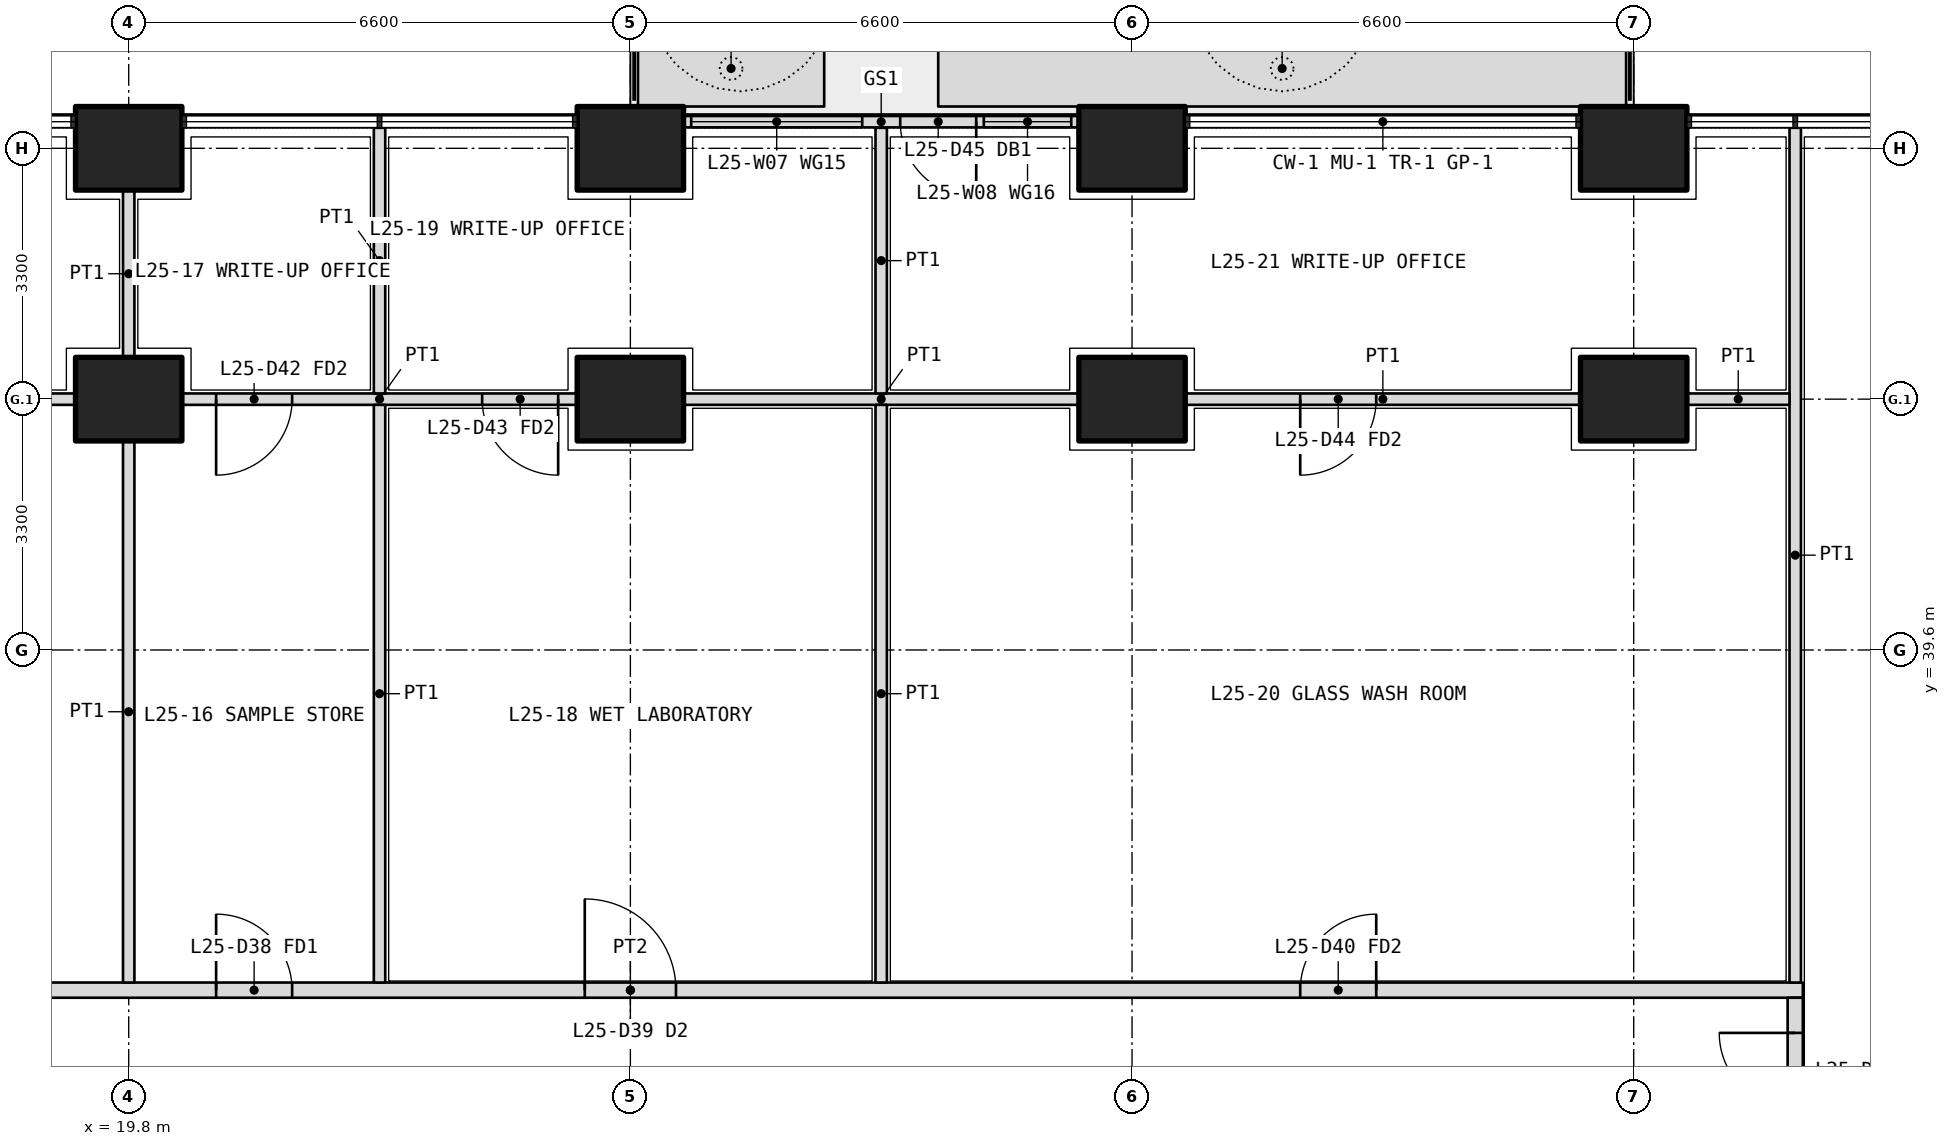
"""IFC4 building model, lengths in metres.
Left out: names, types, materials, properties, quantities, classifications, styles, units other than length and angle.
Written with IfcOpenShell. Run it as: python <this file> out.ifc"""

import sys

from ifc_helpers import new_model, si_unit, direction, frame, frame_2d, origin, origin_2d, place, context, subcontext, project, spatial, polyline, rectangle, outline, extrude, element, fill, save


model = new_model("IFC4")
c1 = context("Model", 3, precision=1e-05, world=origin(), true_north=direction((0.0, 1.0)))
c2 = subcontext(c1, "Body", "Model", "MODEL_VIEW")
j1 = project(units=[si_unit("LENGTHUNIT", "METRE"), si_unit("PLANEANGLEUNIT", "RADIAN")], contexts=[c1])
p1 = place(None, origin())
s1 = spatial("IfcSite", under=j1, at=p1, CompositionType="ELEMENT")
p2 = place(p1, origin())
s2 = spatial("IfcBuilding", under=s1, at=p2, CompositionType="ELEMENT")
p3 = place(p2, frame((0.0, 0.0, 111.6)))
s3 = spatial("IfcBuildingStorey", under=s2, at=p3, CompositionType="ELEMENT", Elevation=111.6)
for number, where, z_axis, x_axis in (
    (1, (19.8, 46.2, 0.0), (0.0, 0.0, 1.0), (1.0, 0.0, 0.0)),
    (2, (26.4, 46.2, 0.0), (0.0, 0.0, 1.0), (1.0, 0.0, 0.0)),
    (3, (33.0, 46.2, 0.0), (0.0, 0.0, 1.0), (1.0, 0.0, 0.0)),
    (4, (39.6, 46.2, 0.0), (0.0, 0.0, 1.0), (1.0, 0.0, 0.0)),
    (5, (19.8, 42.9, 0.0), (0.0, 0.0, 1.0), (1.0, 0.0, 0.0)),
    (6, (26.4, 42.9, 0.0), (0.0, 0.0, 1.0), (1.0, 0.0, 0.0)),
    (7, (33.0, 42.9, 0.0), (0.0, 0.0, 1.0), (1.0, 0.0, 0.0)),
    (8, (39.6, 42.9, 0.0), (0.0, 0.0, 1.0), (1.0, 0.0, 0.0)),
):
    element("IfcColumn", number, at=place(p3, frame(where, z_axis=z_axis, x_axis=x_axis)), inside=s3, PredefinedType="COLUMN", context=c2, shape_type="SweptSolid", body=[
        extrude(rectangle(XDim=1.4, YDim=1.1, at=origin_2d()), origin(), (0.0, 0.0, 1.0), 4.2),
    ])
p4 = place(p3, origin())
e9 = element("IfcWall", 9, at=p4, inside=s3, PredefinedType="USERDEFINED", context=c2, shape_type="SweptSolid", body=[
    extrude(outline(polyline([(26.5, 46.75), (28.95, 46.75), (28.95, 47.75), (26.5, 47.75), (26.5, 46.75)]), holes=[polyline([(26.65, 46.9), (28.8, 46.9), (28.8, 47.6), (26.65, 47.6), (26.65, 46.9)])]), origin(), (0.0, 0.0, 1.0), 1.05),
])
p5 = place(p3, origin())
e10 = element("IfcWall", 10, at=p5, inside=s3, PredefinedType="USERDEFINED", context=c2, shape_type="SweptSolid", body=[
    extrude(outline(polyline([(30.45, 46.75), (39.5, 46.75), (39.5, 47.75), (30.45, 47.75), (30.45, 46.75)]), holes=[polyline([(30.6, 46.9), (39.35, 46.9), (39.35, 47.6), (30.6, 47.6), (30.6, 46.9)])]), origin(), (0.0, 0.0, 1.0), 1.05),
])
p6 = place(p3, frame((32.3, 46.55, 0.0), z_axis=(0.0, 0.0, 1.0), x_axis=(-1.0, 0.0, 0.0)))
e11 = element("IfcWall", 11, at=p6, inside=s3, PredefinedType="SOLIDWALL", context=c2, shape_type="SweptSolid", body=[
    extrude(rectangle(XDim=5.2, YDim=0.15, at=frame_2d((2.6, 0.0))), origin(), (0.0, 0.0, 1.0), 2.7),
])
p7 = place(p6, frame((1.35, 0.0, 0.0)))
e12 = element("IfcOpeningElement", 12, at=p7, cuts=e11, PredefinedType="OPENING", context=c2, shape_type="SweptSolid", body=[
    extrude(rectangle(XDim=1.0, YDim=2.4, at=frame_2d((0.5, 1.2))), frame((0.0, 0.085, 0.0), z_axis=(0.0, -1.0, 0.0), x_axis=(1.0, 0.0, 0.0)), (0.0, 0.0, 1.0), 0.17),
])
p8 = place(p6, frame((0.1, 0.0, 0.1)))
e13 = element("IfcOpeningElement", 13, at=p8, cuts=e11, PredefinedType="OPENING", context=c2, shape_type="SweptSolid", body=[
    extrude(rectangle(XDim=1.15, YDim=2.3, at=frame_2d((0.575, 1.15))), frame((0.0, 0.085, 0.0), z_axis=(0.0, -1.0, 0.0), x_axis=(1.0, 0.0, 0.0)), (0.0, 0.0, 1.0), 0.17),
])
p9 = place(p6, frame((2.85, 0.0, 0.1)))
e14 = element("IfcOpeningElement", 14, at=p9, cuts=e11, PredefinedType="OPENING", context=c2, shape_type="SweptSolid", body=[
    extrude(rectangle(XDim=2.25, YDim=2.3, at=frame_2d((1.125, 1.15))), frame((0.0, 0.085, 0.0), z_axis=(0.0, -1.0, 0.0), x_axis=(1.0, 0.0, 0.0)), (0.0, 0.0, 1.0), 0.17),
])
p10 = place(p3, frame((10.975, 35.125, 0.0), z_axis=(0.0, 0.0, 1.0), x_axis=(1.0, 0.0, 0.0)))
e15 = element("IfcWall", 15, at=p10, inside=s3, PredefinedType="PARTITIONING", context=c2, shape_type="SweptSolid", body=[
    extrude(rectangle(XDim=30.85, YDim=0.2, at=frame_2d((15.425, 0.0))), origin(), (0.0, 0.0, 1.0), 2.85),
])
p11 = place(p10, frame((3.962, 0.0, 0.0)))
e16 = element("IfcOpeningElement", 16, at=p11, cuts=e15, PredefinedType="OPENING", context=c2, shape_type="SweptSolid", body=[
    extrude(rectangle(XDim=1.0, YDim=2.1, at=frame_2d((0.5, 1.05))), frame((0.0, 0.11, 0.0), z_axis=(0.0, -1.0, 0.0), x_axis=(1.0, 0.0, 0.0)), (0.0, 0.0, 1.0), 0.22),
])
p12 = place(p10, frame((9.975, 0.0, 0.0)))
e17 = element("IfcOpeningElement", 17, at=p12, cuts=e15, PredefinedType="OPENING", context=c2, shape_type="SweptSolid", body=[
    extrude(rectangle(XDim=1.0, YDim=2.1, at=frame_2d((0.5, 1.05))), frame((0.0, 0.11, 0.0), z_axis=(0.0, -1.0, 0.0), x_axis=(1.0, 0.0, 0.0)), (0.0, 0.0, 1.0), 0.22),
])
p13 = place(p10, frame((14.825, 0.0, 0.0)))
e18 = element("IfcOpeningElement", 18, at=p13, cuts=e15, PredefinedType="OPENING", context=c2, shape_type="SweptSolid", body=[
    extrude(rectangle(XDim=1.2, YDim=2.1, at=frame_2d((0.6, 1.05))), frame((0.0, 0.11, 0.0), z_axis=(0.0, -1.0, 0.0), x_axis=(1.0, 0.0, 0.0)), (0.0, 0.0, 1.0), 0.22),
])
p14 = place(p10, frame((24.238, 0.0, 0.0)))
e19 = element("IfcOpeningElement", 19, at=p14, cuts=e15, PredefinedType="OPENING", context=c2, shape_type="SweptSolid", body=[
    extrude(rectangle(XDim=1.0, YDim=2.1, at=frame_2d((0.5, 1.05))), frame((0.0, 0.11, 0.0), z_axis=(0.0, -1.0, 0.0), x_axis=(1.0, 0.0, 0.0)), (0.0, 0.0, 1.0), 0.22),
])
p15 = place(p3, frame((41.725, 7.4, 0.0), z_axis=(0.0, 0.0, 1.0), x_axis=(0.0, 1.0, 0.0)))
e20 = element("IfcWall", 20, at=p15, inside=s3, PredefinedType="PARTITIONING", context=c2, shape_type="SweptSolid", body=[
    extrude(rectangle(XDim=27.625, YDim=0.2, at=frame_2d((13.812, 0.0))), origin(), (0.0, 0.0, 1.0), 2.85),
])
p16 = place(p15, frame((5.65, 0.0, 0.0)))
e21 = element("IfcOpeningElement", 21, at=p16, cuts=e20, PredefinedType="OPENING", context=c2, shape_type="SweptSolid", body=[
    extrude(rectangle(XDim=1.0, YDim=2.1, at=frame_2d((0.5, 1.05))), frame((0.0, 0.11, 0.0), z_axis=(0.0, -1.0, 0.0), x_axis=(1.0, 0.0, 0.0)), (0.0, 0.0, 1.0), 0.22),
])
p17 = place(p15, frame((13.5, 0.0, 0.0)))
e22 = element("IfcOpeningElement", 22, at=p17, cuts=e20, PredefinedType="OPENING", context=c2, shape_type="SweptSolid", body=[
    extrude(rectangle(XDim=1.0, YDim=2.1, at=frame_2d((0.5, 1.05))), frame((0.0, 0.11, 0.0), z_axis=(0.0, -1.0, 0.0), x_axis=(1.0, 0.0, 0.0)), (0.0, 0.0, 1.0), 0.22),
])
p18 = place(p15, frame((16.85, 0.0, 0.0)))
e23 = element("IfcOpeningElement", 23, at=p18, cuts=e20, PredefinedType="OPENING", context=c2, shape_type="SweptSolid", body=[
    extrude(rectangle(XDim=0.9, YDim=2.1, at=frame_2d((0.45, 1.05))), frame((0.0, 0.11, 0.0), z_axis=(0.0, -1.0, 0.0), x_axis=(1.0, 0.0, 0.0)), (0.0, 0.0, 1.0), 0.22),
])
p19 = place(p15, frame((21.8, 0.0, 0.0)))
e24 = element("IfcOpeningElement", 24, at=p19, cuts=e20, PredefinedType="OPENING", context=c2, shape_type="SweptSolid", body=[
    extrude(rectangle(XDim=1.0, YDim=2.1, at=frame_2d((0.5, 1.05))), frame((0.0, 0.11, 0.0), z_axis=(0.0, -1.0, 0.0), x_axis=(1.0, 0.0, 0.0)), (0.0, 0.0, 1.0), 0.22),
])
p20 = place(p15, frame((26.163, 0.0, 0.0)))
e25 = element("IfcOpeningElement", 25, at=p20, cuts=e20, PredefinedType="OPENING", context=c2, shape_type="SweptSolid", body=[
    extrude(rectangle(XDim=1.0, YDim=2.1, at=frame_2d((0.5, 1.05))), frame((0.0, 0.11, 0.0), z_axis=(0.0, -1.0, 0.0), x_axis=(1.0, 0.0, 0.0)), (0.0, 0.0, 1.0), 0.22),
])
p21 = place(p3, frame((41.725, 46.47, 0.0), z_axis=(0.0, 0.0, 1.0), x_axis=(0.0, -1.0, 0.0)))
e26 = element("IfcWall", 26, at=p21, inside=s3, PredefinedType="PARTITIONING", context=c2, shape_type="SweptSolid", body=[
    extrude(rectangle(XDim=11.245, YDim=0.15, at=frame_2d((5.623, 0.0))), origin(), (0.0, 0.0, 1.0), 2.7),
])
p22 = place(p3, frame((41.65, 42.9, 0.0), z_axis=(0.0, 0.0, 1.0), x_axis=(-1.0, 0.0, 0.0)))
e27 = element("IfcWall", 27, at=p22, inside=s3, PredefinedType="PARTITIONING", context=c2, shape_type="SweptSolid", body=[
    extrude(rectangle(XDim=1.35, YDim=0.15, at=frame_2d((0.675, 0.0))), origin(), (0.0, 0.0, 1.0), 3.9),
])
p23 = place(p3, frame((38.9, 42.9, 0.0), z_axis=(0.0, 0.0, 1.0), x_axis=(-1.0, 0.0, 0.0)))
e28 = element("IfcWall", 28, at=p23, inside=s3, PredefinedType="PARTITIONING", context=c2, shape_type="SweptSolid", body=[
    extrude(rectangle(XDim=5.2, YDim=0.15, at=frame_2d((2.6, 0.0))), origin(), (0.0, 0.0, 1.0), 3.9),
])
p24 = place(p23, frame((2.688, 0.0, 0.0)))
e29 = element("IfcOpeningElement", 29, at=p24, cuts=e28, PredefinedType="OPENING", context=c2, shape_type="SweptSolid", body=[
    extrude(rectangle(XDim=1.0, YDim=2.1, at=frame_2d((0.5, 1.05))), frame((0.0, 0.085, 0.0), z_axis=(0.0, -1.0, 0.0), x_axis=(1.0, 0.0, 0.0)), (0.0, 0.0, 1.0), 0.17),
])
p25 = place(p3, frame((32.3, 42.9, 0.0), z_axis=(0.0, 0.0, 1.0), x_axis=(-1.0, 0.0, 0.0)))
e30 = element("IfcWall", 30, at=p25, inside=s3, PredefinedType="PARTITIONING", context=c2, shape_type="SweptSolid", body=[
    extrude(rectangle(XDim=5.2, YDim=0.15, at=frame_2d((2.6, 0.0))), origin(), (0.0, 0.0, 1.0), 3.9),
])
p26 = place(p3, frame((25.7, 42.9, 0.0), z_axis=(0.0, 0.0, 1.0), x_axis=(-1.0, 0.0, 0.0)))
e31 = element("IfcWall", 31, at=p26, inside=s3, PredefinedType="PARTITIONING", context=c2, shape_type="SweptSolid", body=[
    extrude(rectangle(XDim=5.2, YDim=0.15, at=frame_2d((2.6, 0.0))), origin(), (0.0, 0.0, 1.0), 3.9),
])
p27 = place(p26, frame((3.75, 0.0, 0.0)))
e32 = element("IfcOpeningElement", 32, at=p27, cuts=e31, PredefinedType="OPENING", context=c2, shape_type="SweptSolid", body=[
    extrude(rectangle(XDim=1.0, YDim=2.1, at=frame_2d((0.5, 1.05))), frame((0.0, 0.085, 0.0), z_axis=(0.0, -1.0, 0.0), x_axis=(1.0, 0.0, 0.0)), (0.0, 0.0, 1.0), 0.17),
])
p28 = place(p26, frame((0.25, 0.0, 0.0)))
e33 = element("IfcOpeningElement", 33, at=p28, cuts=e31, PredefinedType="OPENING", context=c2, shape_type="SweptSolid", body=[
    extrude(rectangle(XDim=1.0, YDim=2.1, at=frame_2d((0.5, 1.05))), frame((0.0, 0.085, 0.0), z_axis=(0.0, -1.0, 0.0), x_axis=(1.0, 0.0, 0.0)), (0.0, 0.0, 1.0), 0.17),
])
p29 = place(p3, frame((19.1, 42.9, 0.0), z_axis=(0.0, 0.0, 1.0), x_axis=(-1.0, 0.0, 0.0)))
e34 = element("IfcWall", 34, at=p29, inside=s3, PredefinedType="PARTITIONING", context=c2, shape_type="SweptSolid", body=[
    extrude(rectangle(XDim=5.2, YDim=0.15, at=frame_2d((2.6, 0.0))), origin(), (0.0, 0.0, 1.0), 3.9),
])
p30 = place(p3, frame((19.8, 45.65, 0.0), z_axis=(0.0, 0.0, 1.0), x_axis=(0.0, -1.0, 0.0)))
e35 = element("IfcWall", 35, at=p30, inside=s3, PredefinedType="PARTITIONING", context=c2, shape_type="SweptSolid", body=[
    extrude(rectangle(XDim=2.2, YDim=0.15, at=frame_2d((1.1, 0.0))), origin(), (0.0, 0.0, 1.0), 2.85),
])
p31 = place(p3, frame((19.8, 42.35, 0.0), z_axis=(0.0, 0.0, 1.0), x_axis=(0.0, -1.0, 0.0)))
e36 = element("IfcWall", 36, at=p31, inside=s3, PredefinedType="PARTITIONING", context=c2, shape_type="SweptSolid", body=[
    extrude(rectangle(XDim=7.125, YDim=0.15, at=frame_2d((3.562, 0.0))), origin(), (0.0, 0.0, 1.0), 2.85),
])
p32 = place(p3, frame((23.1, 46.47, 0.0), z_axis=(0.0, 0.0, 1.0), x_axis=(0.0, -1.0, 0.0)))
e37 = element("IfcWall", 37, at=p32, inside=s3, PredefinedType="PARTITIONING", context=c2, shape_type="SweptSolid", body=[
    extrude(rectangle(XDim=3.495, YDim=0.15, at=frame_2d((1.748, 0.0))), origin(), (0.0, 0.0, 1.0), 2.7),
])
p33 = place(p3, frame((23.1, 42.825, 0.0), z_axis=(0.0, 0.0, 1.0), x_axis=(0.0, -1.0, 0.0)))
e38 = element("IfcWall", 38, at=p33, inside=s3, PredefinedType="PARTITIONING", context=c2, shape_type="SweptSolid", body=[
    extrude(rectangle(XDim=7.6, YDim=0.15, at=frame_2d((3.8, 0.0))), origin(), (0.0, 0.0, 1.0), 3.9),
])
p34 = place(p3, frame((29.7, 46.47, 0.0), z_axis=(0.0, 0.0, 1.0), x_axis=(0.0, -1.0, 0.0)))
e39 = element("IfcWall", 39, at=p34, inside=s3, PredefinedType="PARTITIONING", context=c2, shape_type="SweptSolid", body=[
    extrude(rectangle(XDim=3.495, YDim=0.15, at=frame_2d((1.748, 0.0))), origin(), (0.0, 0.0, 1.0), 2.7),
])
p35 = place(p3, frame((29.7, 42.825, 0.0), z_axis=(0.0, 0.0, 1.0), x_axis=(0.0, -1.0, 0.0)))
e40 = element("IfcWall", 40, at=p35, inside=s3, PredefinedType="PARTITIONING", context=c2, shape_type="SweptSolid", body=[
    extrude(rectangle(XDim=7.6, YDim=0.15, at=frame_2d((3.8, 0.0))), origin(), (0.0, 0.0, 1.0), 3.9),
])
p36 = place(p7, origin())
e41 = element("IfcDoor", 41, at=p36, inside=s3, OperationType="SINGLE_SWING_LEFT", PredefinedType="DOOR", context=c2, shape_type="SweptSolid", body=[
    extrude(rectangle(XDim=1.0, YDim=2.4, at=frame_2d((0.5, 1.2))), frame((0.0, 0.025, 0.0), z_axis=(0.0, -1.0, 0.0), x_axis=(1.0, 0.0, 0.0)), (0.0, 0.0, 1.0), 0.05),
])
fill(e12, e41)
p37 = place(p8, origin())
e42 = element("IfcWindow", 42, at=p37, inside=s3, PartitioningType="SINGLE_PANEL", PredefinedType="WINDOW", context=c2, shape_type="SweptSolid", body=[
    extrude(rectangle(XDim=1.15, YDim=2.3, at=frame_2d((0.575, 1.15))), frame((0.0, 0.03, 0.0), z_axis=(0.0, -1.0, 0.0), x_axis=(1.0, 0.0, 0.0)), (0.0, 0.0, 1.0), 0.06),
])
fill(e13, e42)
p38 = place(p9, origin())
e43 = element("IfcWindow", 43, at=p38, inside=s3, PartitioningType="SINGLE_PANEL", PredefinedType="WINDOW", context=c2, shape_type="SweptSolid", body=[
    extrude(rectangle(XDim=2.25, YDim=2.3, at=frame_2d((1.125, 1.15))), frame((0.0, 0.03, 0.0), z_axis=(0.0, -1.0, 0.0), x_axis=(1.0, 0.0, 0.0)), (0.0, 0.0, 1.0), 0.06),
])
fill(e14, e43)
p39 = place(p20, origin())
e44 = element("IfcDoor", 44, at=p39, inside=s3, OperationType="SINGLE_SWING_RIGHT", PredefinedType="DOOR", context=c2, shape_type="SweptSolid", body=[
    extrude(rectangle(XDim=1.0, YDim=2.1, at=frame_2d((0.5, 1.05))), frame((0.0, 0.025, 0.0), z_axis=(0.0, -1.0, 0.0), x_axis=(1.0, 0.0, 0.0)), (0.0, 0.0, 1.0), 0.05),
])
fill(e25, e44)
p40 = place(p12, origin())
e45 = element("IfcDoor", 45, at=p40, inside=s3, OperationType="SINGLE_SWING_LEFT", PredefinedType="DOOR", context=c2, shape_type="SweptSolid", body=[
    extrude(rectangle(XDim=1.0, YDim=2.1, at=frame_2d((0.5, 1.05))), frame((0.0, 0.025, 0.0), z_axis=(0.0, -1.0, 0.0), x_axis=(1.0, 0.0, 0.0)), (0.0, 0.0, 1.0), 0.05),
])
fill(e17, e45)
p41 = place(p27, origin())
e46 = element("IfcDoor", 46, at=p41, inside=s3, OperationType="SINGLE_SWING_RIGHT", PredefinedType="DOOR", context=c2, shape_type="SweptSolid", body=[
    extrude(rectangle(XDim=1.0, YDim=2.1, at=frame_2d((0.5, 1.05))), frame((0.0, 0.025, 0.0), z_axis=(0.0, -1.0, 0.0), x_axis=(1.0, 0.0, 0.0)), (0.0, 0.0, 1.0), 0.05),
])
fill(e32, e46)
p42 = place(p13, origin())
e47 = element("IfcDoor", 47, at=p42, inside=s3, OperationType="DOUBLE_DOOR_SINGLE_SWING", PredefinedType="DOOR", context=c2, shape_type="SweptSolid", body=[
    extrude(rectangle(XDim=1.2, YDim=2.1, at=frame_2d((0.6, 1.05))), frame((0.0, 0.025, 0.0), z_axis=(0.0, -1.0, 0.0), x_axis=(1.0, 0.0, 0.0)), (0.0, 0.0, 1.0), 0.05),
])
fill(e18, e47)
p43 = place(p28, origin())
e48 = element("IfcDoor", 48, at=p43, inside=s3, OperationType="SINGLE_SWING_LEFT", PredefinedType="DOOR", context=c2, shape_type="SweptSolid", body=[
    extrude(rectangle(XDim=1.0, YDim=2.1, at=frame_2d((0.5, 1.05))), frame((0.0, 0.025, 0.0), z_axis=(0.0, -1.0, 0.0), x_axis=(1.0, 0.0, 0.0)), (0.0, 0.0, 1.0), 0.05),
])
fill(e33, e48)
p44 = place(p14, origin())
e49 = element("IfcDoor", 49, at=p44, inside=s3, OperationType="SINGLE_SWING_RIGHT", PredefinedType="DOOR", context=c2, shape_type="SweptSolid", body=[
    extrude(rectangle(XDim=1.0, YDim=2.1, at=frame_2d((0.5, 1.05))), frame((0.0, 0.025, 0.0), z_axis=(0.0, -1.0, 0.0), x_axis=(1.0, 0.0, 0.0)), (0.0, 0.0, 1.0), 0.05),
])
fill(e19, e49)
p45 = place(p24, origin())
e50 = element("IfcDoor", 50, at=p45, inside=s3, OperationType="SINGLE_SWING_RIGHT", PredefinedType="DOOR", context=c2, shape_type="SweptSolid", body=[
    extrude(rectangle(XDim=1.0, YDim=2.1, at=frame_2d((0.5, 1.05))), frame((0.0, 0.025, 0.0), z_axis=(0.0, -1.0, 0.0), x_axis=(1.0, 0.0, 0.0)), (0.0, 0.0, 1.0), 0.05),
])
fill(e29, e50)
save(model, sys.argv[1])
